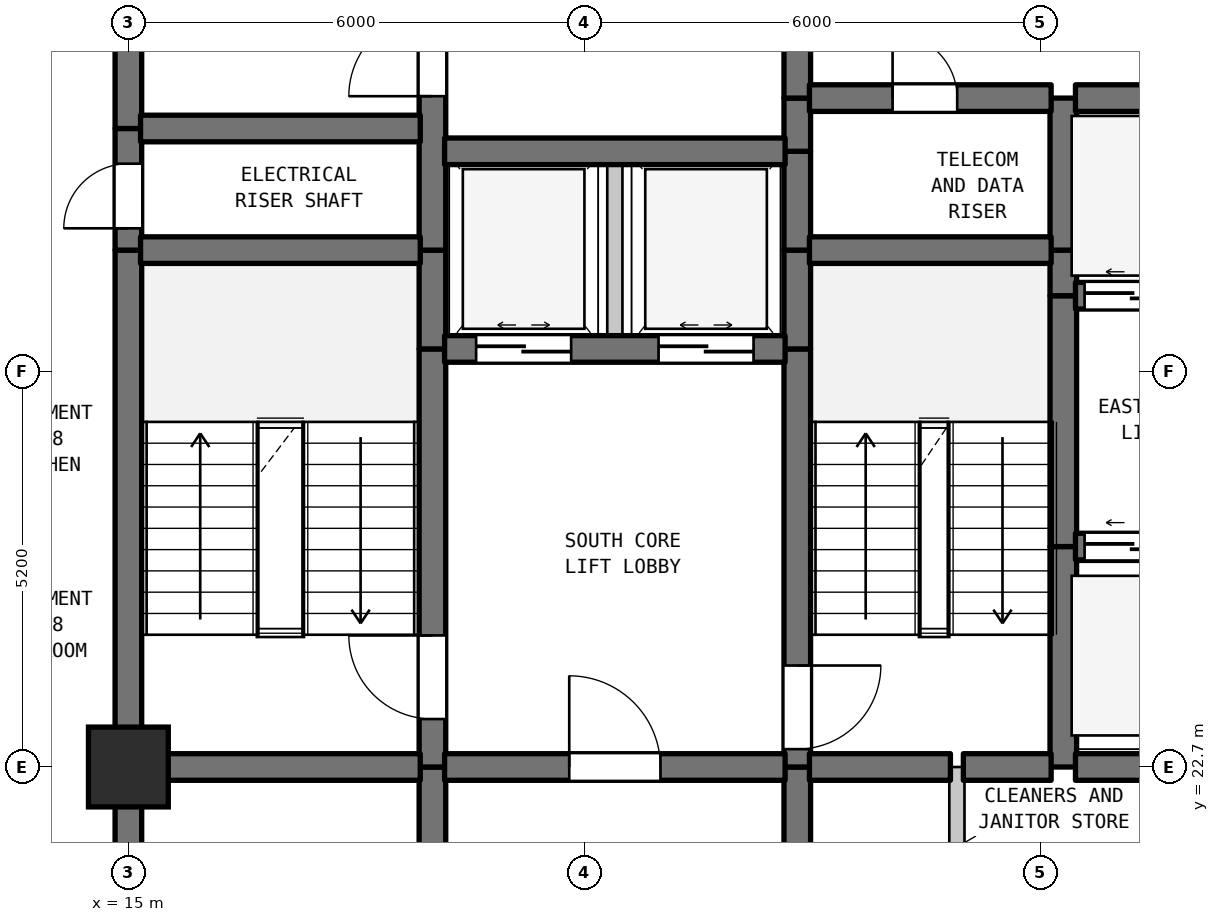
"""IFC4 building model, lengths in metres.
Left out: names, types, materials, properties, quantities, classifications, styles, units other than length and angle.
Written with IfcOpenShell. Run it as: python <this file> out.ifc"""

import sys

from ifc_helpers import new_model, si_unit, direction, frame, frame_2d, origin, origin_2d, place, context, subcontext, project, spatial, rectangle, extrude, element, fill, save


model = new_model("IFC4")
c1 = context("Model", 3, precision=1e-05, world=origin(), true_north=direction((0.0, 1.0)))
c2 = subcontext(c1, "Body", "Model", "MODEL_VIEW")
j1 = project(units=[si_unit("LENGTHUNIT", "METRE"), si_unit("PLANEANGLEUNIT", "RADIAN")], contexts=[c1])
p1 = place(None, origin())
s1 = spatial("IfcSite", under=j1, at=p1, CompositionType="ELEMENT")
p2 = place(p1, origin())
s2 = spatial("IfcBuilding", under=s1, at=p2, CompositionType="ELEMENT")
p3 = place(p2, frame((0.0, 0.0, 98.3)))
s3 = spatial("IfcBuildingStorey", under=s2, at=p3, CompositionType="ELEMENT", Elevation=98.3)
p4 = place(p3, frame((15.0, 22.7, 0.0), z_axis=(0.0, 0.0, 1.0), x_axis=(1.0, 0.0, 0.0)))
e1 = element("IfcColumn", 1, at=p4, inside=s3, PredefinedType="COLUMN", context=c2, shape_type="SweptSolid", body=[
    extrude(rectangle(XDim=1.05, YDim=1.05, at=origin_2d()), origin(), (0.0, 0.0, 1.0), 3.7),
])
p5 = place(p3, frame((15.0, 19.5, 0.0), z_axis=(0.0, 0.0, 1.0), x_axis=(0.0, 1.0, 0.0)))
e2 = element("IfcWall", 2, at=p5, inside=s3, PredefinedType="SHEAR", context=c2, shape_type="SweptSolid", body=[
    extrude(rectangle(XDim=3.2, YDim=0.35, at=frame_2d((1.6, 0.0))), origin(), (0.0, 0.0, 1.0), 3.385),
])
p6 = place(p3, frame((15.0, 22.7, 0.0), z_axis=(0.0, 0.0, 1.0), x_axis=(0.0, 1.0, 0.0)))
e3 = element("IfcWall", 3, at=p6, inside=s3, PredefinedType="SHEAR", context=c2, shape_type="SweptSolid", body=[
    extrude(rectangle(XDim=6.8, YDim=0.35, at=frame_2d((3.4, 0.0))), origin(), (0.0, 0.0, 1.0), 3.385),
])
p7 = place(p3, frame((15.0, 29.5, 0.0), z_axis=(0.0, 0.0, 1.0), x_axis=(0.0, 1.0, 0.0)))
e4 = element("IfcWall", 4, at=p7, inside=s3, PredefinedType="SHEAR", context=c2, shape_type="SweptSolid", body=[
    extrude(rectangle(XDim=1.6, YDim=0.35, at=frame_2d((0.8, 0.0))), origin(), (0.0, 0.0, 1.0), 3.385),
])
p8 = place(p7, frame((0.287, 0.0, 0.0)))
e5 = element("IfcOpeningElement", 5, at=p8, cuts=e4, PredefinedType="OPENING", context=c2, shape_type="SweptSolid", body=[
    extrude(rectangle(XDim=0.85, YDim=2.1, at=frame_2d((0.425, 1.05))), frame((0.0, 0.185, 0.0), z_axis=(0.0, -1.0, 0.0), x_axis=(1.0, 0.0, 0.0)), (0.0, 0.0, 1.0), 0.37),
])
p9 = place(p3, frame((15.0, 31.1, 0.0), z_axis=(0.0, 0.0, 1.0), x_axis=(0.0, 1.0, 0.0)))
e6 = element("IfcWall", 6, at=p9, inside=s3, PredefinedType="SHEAR", context=c2, shape_type="SweptSolid", body=[
    extrude(rectangle(XDim=6.8, YDim=0.35, at=frame_2d((3.4, 0.0))), origin(), (0.0, 0.0, 1.0), 3.385),
])
p10 = place(p3, frame((19.0, 19.5, 0.0), z_axis=(0.0, 0.0, 1.0), x_axis=(0.0, 1.0, 0.0)))
e7 = element("IfcWall", 7, at=p10, inside=s3, PredefinedType="SHEAR", context=c2, shape_type="SweptSolid", body=[
    extrude(rectangle(XDim=3.2, YDim=0.35, at=frame_2d((1.6, 0.0))), origin(), (0.0, 0.0, 1.0), 3.385),
])
p11 = place(p3, frame((19.0, 22.7, 0.0), z_axis=(0.0, 0.0, 1.0), x_axis=(0.0, 1.0, 0.0)))
e8 = element("IfcWall", 8, at=p11, inside=s3, PredefinedType="SHEAR", context=c2, shape_type="SweptSolid", body=[
    extrude(rectangle(XDim=5.5, YDim=0.35, at=frame_2d((2.75, 0.0))), origin(), (0.0, 0.0, 1.0), 3.385),
])
p12 = place(p11, frame((0.631, 0.0, 0.0)))
e9 = element("IfcOpeningElement", 9, at=p12, cuts=e8, PredefinedType="OPENING", context=c2, shape_type="SweptSolid", body=[
    extrude(rectangle(XDim=1.1, YDim=2.15, at=frame_2d((0.55, 1.075))), frame((0.0, 0.185, 0.0), z_axis=(0.0, -1.0, 0.0), x_axis=(1.0, 0.0, 0.0)), (0.0, 0.0, 1.0), 0.37),
])
p13 = place(p3, frame((19.0, 28.2, 0.0), z_axis=(0.0, 0.0, 1.0), x_axis=(0.0, 1.0, 0.0)))
e10 = element("IfcWall", 10, at=p13, inside=s3, PredefinedType="SHEAR", context=c2, shape_type="SweptSolid", body=[
    extrude(rectangle(XDim=1.3, YDim=0.35, at=frame_2d((0.65, 0.0))), origin(), (0.0, 0.0, 1.0), 3.385),
])
p14 = place(p3, frame((19.0, 29.5, 0.0), z_axis=(0.0, 0.0, 1.0), x_axis=(0.0, 1.0, 0.0)))
e11 = element("IfcWall", 11, at=p14, inside=s3, PredefinedType="SHEAR", context=c2, shape_type="SweptSolid", body=[
    extrude(rectangle(XDim=5.5, YDim=0.35, at=frame_2d((2.75, 0.0))), origin(), (0.0, 0.0, 1.0), 3.385),
])
p15 = place(p14, frame((2.025, 0.0, 0.0)))
e12 = element("IfcOpeningElement", 12, at=p15, cuts=e11, PredefinedType="OPENING", context=c2, shape_type="SweptSolid", body=[
    extrude(rectangle(XDim=1.1, YDim=2.15, at=frame_2d((0.55, 1.075))), frame((0.0, 0.185, 0.0), z_axis=(0.0, -1.0, 0.0), x_axis=(1.0, 0.0, 0.0)), (0.0, 0.0, 1.0), 0.37),
])
p16 = place(p3, frame((21.4, 28.2, 0.0), z_axis=(0.0, 0.0, 1.0), x_axis=(0.0, 1.0, 0.0)))
e13 = element("IfcWall", 13, at=p16, inside=s3, PredefinedType="STANDARD", context=c2, shape_type="SweptSolid", body=[
    extrude(rectangle(XDim=2.6, YDim=0.2, at=frame_2d((1.3, 0.0))), origin(), (0.0, 0.0, 1.0), 3.385),
])
p17 = place(p3, frame((23.8, 19.5, 0.0), z_axis=(0.0, 0.0, 1.0), x_axis=(0.0, 1.0, 0.0)))
e14 = element("IfcWall", 14, at=p17, inside=s3, PredefinedType="SHEAR", context=c2, shape_type="SweptSolid", body=[
    extrude(rectangle(XDim=3.2, YDim=0.35, at=frame_2d((1.6, 0.0))), origin(), (0.0, 0.0, 1.0), 3.385),
])
p18 = place(p3, frame((23.8, 22.7, 0.0), z_axis=(0.0, 0.0, 1.0), x_axis=(0.0, 1.0, 0.0)))
e15 = element("IfcWall", 15, at=p18, inside=s3, PredefinedType="SHEAR", context=c2, shape_type="SweptSolid", body=[
    extrude(rectangle(XDim=5.5, YDim=0.35, at=frame_2d((2.75, 0.0))), origin(), (0.0, 0.0, 1.0), 3.385),
])
p19 = place(p18, frame((0.235, 0.0, 0.0)))
e16 = element("IfcOpeningElement", 16, at=p19, cuts=e15, PredefinedType="OPENING", context=c2, shape_type="SweptSolid", body=[
    extrude(rectangle(XDim=1.1, YDim=2.15, at=frame_2d((0.55, 1.075))), frame((0.0, 0.185, 0.0), z_axis=(0.0, -1.0, 0.0), x_axis=(1.0, 0.0, 0.0)), (0.0, 0.0, 1.0), 0.37),
])
for number, where, z_axis, x_axis in (
    (17, (23.8, 28.2, 0.0), (0.0, 0.0, 1.0), (0.0, 1.0, 0.0)),
    (18, (23.8, 29.5, 0.0), (0.0, 0.0, 1.0), (0.0, 1.0, 0.0)),
):
    element("IfcWall", number, at=place(p3, frame(where, z_axis=z_axis, x_axis=x_axis)), inside=s3, PredefinedType="SHEAR", context=c2, shape_type="SweptSolid", body=[
        extrude(rectangle(XDim=1.3, YDim=0.35, at=frame_2d((0.65, 0.0))), origin(), (0.0, 0.0, 1.0), 3.385),
    ])
p20 = place(p3, frame((23.8, 30.8, 0.0), z_axis=(0.0, 0.0, 1.0), x_axis=(0.0, 1.0, 0.0)))
e19 = element("IfcWall", 19, at=p20, inside=s3, PredefinedType="SHEAR", context=c2, shape_type="SweptSolid", body=[
    extrude(rectangle(XDim=0.7, YDim=0.35, at=frame_2d((0.35, 0.0))), origin(), (0.0, 0.0, 1.0), 3.385),
])
p21 = place(p3, frame((23.8, 31.5, 0.0), z_axis=(0.0, 0.0, 1.0), x_axis=(0.0, 1.0, 0.0)))
e20 = element("IfcWall", 20, at=p21, inside=s3, PredefinedType="SHEAR", context=c2, shape_type="SweptSolid", body=[
    extrude(rectangle(XDim=3.5, YDim=0.35, at=frame_2d((1.75, 0.0))), origin(), (0.0, 0.0, 1.0), 3.385),
])
p22 = place(p21, frame((1.127, 0.0, 0.0)))
e21 = element("IfcOpeningElement", 21, at=p22, cuts=e20, PredefinedType="OPENING", context=c2, shape_type="SweptSolid", body=[
    extrude(rectangle(XDim=1.1, YDim=2.15, at=frame_2d((0.55, 1.075))), frame((0.0, 0.185, 0.0), z_axis=(0.0, -1.0, 0.0), x_axis=(1.0, 0.0, 0.0)), (0.0, 0.0, 1.0), 0.37),
])
p23 = place(p3, frame((25.9, 19.5, 0.0), z_axis=(0.0, 0.0, 1.0), x_axis=(0.0, 1.0, 0.0)))
e22 = element("IfcWall", 22, at=p23, inside=s3, PredefinedType="STANDARD", context=c2, shape_type="SweptSolid", body=[
    extrude(rectangle(XDim=3.2, YDim=0.2, at=frame_2d((1.6, 0.0))), origin(), (0.0, 0.0, 1.0), 3.385),
])
p24 = place(p3, frame((27.3, 22.7, 0.0), z_axis=(0.0, 0.0, 1.0), x_axis=(0.0, 1.0, 0.0)))
e23 = element("IfcWall", 23, at=p24, inside=s3, PredefinedType="SHEAR", context=c2, shape_type="SweptSolid", body=[
    extrude(rectangle(XDim=2.9, YDim=0.35, at=frame_2d((1.45, 0.0))), origin(), (0.0, 0.0, 1.0), 3.385),
])
p25 = place(p3, frame((27.3, 25.6, 0.0), z_axis=(0.0, 0.0, 1.0), x_axis=(0.0, 1.0, 0.0)))
e24 = element("IfcWall", 24, at=p25, inside=s3, PredefinedType="SHEAR", context=c2, shape_type="SweptSolid", body=[
    extrude(rectangle(XDim=3.3, YDim=0.35, at=frame_2d((1.65, 0.0))), origin(), (0.0, 0.0, 1.0), 3.385),
])
p26 = place(p3, frame((27.3, 28.9, 0.0), z_axis=(0.0, 0.0, 1.0), x_axis=(0.0, 1.0, 0.0)))
e25 = element("IfcWall", 25, at=p26, inside=s3, PredefinedType="SHEAR", context=c2, shape_type="SweptSolid", body=[
    extrude(rectangle(XDim=0.6, YDim=0.35, at=frame_2d((0.3, 0.0))), origin(), (0.0, 0.0, 1.0), 3.385),
])
p27 = place(p3, frame((27.3, 29.5, 0.0), z_axis=(0.0, 0.0, 1.0), x_axis=(0.0, 1.0, 0.0)))
e26 = element("IfcWall", 26, at=p27, inside=s3, PredefinedType="SHEAR", context=c2, shape_type="SweptSolid", body=[
    extrude(rectangle(XDim=2.0, YDim=0.35, at=frame_2d((1.0, 0.0))), origin(), (0.0, 0.0, 1.0), 3.385),
])
p28 = place(p3, frame((15.16, 22.7, 0.0), z_axis=(0.0, 0.0, 1.0), x_axis=(1.0, 0.0, 0.0)))
e27 = element("IfcWall", 27, at=p28, inside=s3, PredefinedType="SHEAR", context=c2, shape_type="SweptSolid", body=[
    extrude(rectangle(XDim=3.68, YDim=0.35, at=frame_2d((1.84, 0.0))), origin(), (0.0, 0.0, 1.0), 3.385),
])
p29 = place(p3, frame((19.16, 22.7, 0.0), z_axis=(0.0, 0.0, 1.0), x_axis=(1.0, 0.0, 0.0)))
e28 = element("IfcWall", 28, at=p29, inside=s3, PredefinedType="SHEAR", context=c2, shape_type="SweptSolid", body=[
    extrude(rectangle(XDim=4.48, YDim=0.35, at=frame_2d((2.24, 0.0))), origin(), (0.0, 0.0, 1.0), 3.385),
])
p30 = place(p29, frame((1.64, 0.0, 0.0)))
e29 = element("IfcOpeningElement", 29, at=p30, cuts=e28, PredefinedType="OPENING", context=c2, shape_type="SweptSolid", body=[
    extrude(rectangle(XDim=1.2, YDim=2.2, at=frame_2d((0.6, 1.1))), frame((0.0, 0.185, 0.0), z_axis=(0.0, -1.0, 0.0), x_axis=(1.0, 0.0, 0.0)), (0.0, 0.0, 1.0), 0.37),
])
p31 = place(p3, frame((23.96, 22.7, 0.0), z_axis=(0.0, 0.0, 1.0), x_axis=(1.0, 0.0, 0.0)))
e30 = element("IfcWall", 30, at=p31, inside=s3, PredefinedType="SHEAR", context=c2, shape_type="SweptSolid", body=[
    extrude(rectangle(XDim=1.855, YDim=0.35, at=frame_2d((0.927, 0.0))), origin(), (0.0, 0.0, 1.0), 3.385),
])
p32 = place(p3, frame((25.985, 22.7, 0.0), z_axis=(0.0, 0.0, 1.0), x_axis=(1.0, 0.0, 0.0)))
e31 = element("IfcWall", 31, at=p32, inside=s3, PredefinedType="SHEAR", context=c2, shape_type="SweptSolid", body=[
    extrude(rectangle(XDim=1.155, YDim=0.35, at=frame_2d((0.577, 0.0))), origin(), (0.0, 0.0, 1.0), 3.385),
])
p33 = place(p3, frame((27.46, 22.7, 0.0), z_axis=(0.0, 0.0, 1.0), x_axis=(1.0, 0.0, 0.0)))
e32 = element("IfcWall", 32, at=p33, inside=s3, PredefinedType="SHEAR", context=c2, shape_type="SweptSolid", body=[
    extrude(rectangle(XDim=3.18, YDim=0.35, at=frame_2d((1.59, 0.0))), origin(), (0.0, 0.0, 1.0), 3.385),
])
p34 = place(p3, frame((27.46, 25.6, 0.0), z_axis=(0.0, 0.0, 1.0), x_axis=(1.0, 0.0, 0.0)))
e33 = element("IfcWall", 33, at=p34, inside=s3, PredefinedType="SHEAR", context=c2, shape_type="SweptSolid", body=[
    extrude(rectangle(XDim=3.18, YDim=0.35, at=frame_2d((1.59, 0.0))), origin(), (0.0, 0.0, 1.0), 3.385),
])
p35 = place(p34, frame((0.12, 0.0, 0.0)))
e34 = element("IfcOpeningElement", 34, at=p35, cuts=e33, PredefinedType="OPENING", context=c2, shape_type="SweptSolid", body=[
    extrude(rectangle(XDim=1.25, YDim=2.2, at=frame_2d((0.625, 1.1))), frame((0.0, 0.185, 0.0), z_axis=(0.0, -1.0, 0.0), x_axis=(1.0, 0.0, 0.0)), (0.0, 0.0, 1.0), 0.37),
])
p36 = place(p34, frame((1.81, 0.0, 0.0)))
e35 = element("IfcOpeningElement", 35, at=p36, cuts=e33, PredefinedType="OPENING", context=c2, shape_type="SweptSolid", body=[
    extrude(rectangle(XDim=1.25, YDim=2.2, at=frame_2d((0.625, 1.1))), frame((0.0, 0.185, 0.0), z_axis=(0.0, -1.0, 0.0), x_axis=(1.0, 0.0, 0.0)), (0.0, 0.0, 1.0), 0.37),
])
p37 = place(p3, frame((19.16, 28.2, 0.0), z_axis=(0.0, 0.0, 1.0), x_axis=(1.0, 0.0, 0.0)))
e36 = element("IfcWall", 36, at=p37, inside=s3, PredefinedType="SHEAR", context=c2, shape_type="SweptSolid", body=[
    extrude(rectangle(XDim=4.48, YDim=0.35, at=frame_2d((2.24, 0.0))), origin(), (0.0, 0.0, 1.0), 3.385),
])
p38 = place(p37, frame((0.415, 0.0, 0.0)))
e37 = element("IfcOpeningElement", 37, at=p38, cuts=e36, PredefinedType="OPENING", context=c2, shape_type="SweptSolid", body=[
    extrude(rectangle(XDim=1.25, YDim=2.2, at=frame_2d((0.625, 1.1))), frame((0.0, 0.185, 0.0), z_axis=(0.0, -1.0, 0.0), x_axis=(1.0, 0.0, 0.0)), (0.0, 0.0, 1.0), 0.37),
])
p39 = place(p37, frame((2.815, 0.0, 0.0)))
e38 = element("IfcOpeningElement", 38, at=p39, cuts=e36, PredefinedType="OPENING", context=c2, shape_type="SweptSolid", body=[
    extrude(rectangle(XDim=1.25, YDim=2.2, at=frame_2d((0.625, 1.1))), frame((0.0, 0.185, 0.0), z_axis=(0.0, -1.0, 0.0), x_axis=(1.0, 0.0, 0.0)), (0.0, 0.0, 1.0), 0.37),
])
p40 = place(p3, frame((27.46, 28.9, 0.0), z_axis=(0.0, 0.0, 1.0), x_axis=(1.0, 0.0, 0.0)))
e39 = element("IfcWall", 39, at=p40, inside=s3, PredefinedType="SHEAR", context=c2, shape_type="SweptSolid", body=[
    extrude(rectangle(XDim=3.18, YDim=0.35, at=frame_2d((1.59, 0.0))), origin(), (0.0, 0.0, 1.0), 3.385),
])
p41 = place(p40, frame((0.12, 0.0, 0.0)))
e40 = element("IfcOpeningElement", 40, at=p41, cuts=e39, PredefinedType="OPENING", context=c2, shape_type="SweptSolid", body=[
    extrude(rectangle(XDim=1.25, YDim=2.2, at=frame_2d((0.625, 1.1))), frame((0.0, 0.185, 0.0), z_axis=(0.0, -1.0, 0.0), x_axis=(1.0, 0.0, 0.0)), (0.0, 0.0, 1.0), 0.37),
])
p42 = place(p40, frame((1.81, 0.0, 0.0)))
e41 = element("IfcOpeningElement", 41, at=p42, cuts=e39, PredefinedType="OPENING", context=c2, shape_type="SweptSolid", body=[
    extrude(rectangle(XDim=1.25, YDim=2.2, at=frame_2d((0.625, 1.1))), frame((0.0, 0.185, 0.0), z_axis=(0.0, -1.0, 0.0), x_axis=(1.0, 0.0, 0.0)), (0.0, 0.0, 1.0), 0.37),
])
p43 = place(p3, frame((15.16, 29.5, 0.0), z_axis=(0.0, 0.0, 1.0), x_axis=(1.0, 0.0, 0.0)))
e42 = element("IfcWall", 42, at=p43, inside=s3, PredefinedType="SHEAR", context=c2, shape_type="SweptSolid", body=[
    extrude(rectangle(XDim=3.68, YDim=0.35, at=frame_2d((1.84, 0.0))), origin(), (0.0, 0.0, 1.0), 3.385),
])
p44 = place(p3, frame((23.96, 29.5, 0.0), z_axis=(0.0, 0.0, 1.0), x_axis=(1.0, 0.0, 0.0)))
e43 = element("IfcWall", 43, at=p44, inside=s3, PredefinedType="SHEAR", context=c2, shape_type="SweptSolid", body=[
    extrude(rectangle(XDim=3.18, YDim=0.35, at=frame_2d((1.59, 0.0))), origin(), (0.0, 0.0, 1.0), 3.385),
])
p45 = place(p3, frame((19.16, 30.8, 0.0), z_axis=(0.0, 0.0, 1.0), x_axis=(1.0, 0.0, 0.0)))
e44 = element("IfcWall", 44, at=p45, inside=s3, PredefinedType="SHEAR", context=c2, shape_type="SweptSolid", body=[
    extrude(rectangle(XDim=4.48, YDim=0.35, at=frame_2d((2.24, 0.0))), origin(), (0.0, 0.0, 1.0), 3.385),
])
p46 = place(p3, frame((15.16, 31.1, 0.0), z_axis=(0.0, 0.0, 1.0), x_axis=(1.0, 0.0, 0.0)))
e45 = element("IfcWall", 45, at=p46, inside=s3, PredefinedType="SHEAR", context=c2, shape_type="SweptSolid", body=[
    extrude(rectangle(XDim=3.68, YDim=0.35, at=frame_2d((1.84, 0.0))), origin(), (0.0, 0.0, 1.0), 3.385),
])
p47 = place(p3, frame((23.96, 31.5, 0.0), z_axis=(0.0, 0.0, 1.0), x_axis=(1.0, 0.0, 0.0)))
e46 = element("IfcWall", 46, at=p47, inside=s3, PredefinedType="SHEAR", context=c2, shape_type="SweptSolid", body=[
    extrude(rectangle(XDim=3.18, YDim=0.35, at=frame_2d((1.59, 0.0))), origin(), (0.0, 0.0, 1.0), 3.385),
])
p48 = place(p47, frame((1.094, 0.0, 0.0)))
e47 = element("IfcOpeningElement", 47, at=p48, cuts=e46, PredefinedType="OPENING", context=c2, shape_type="SweptSolid", body=[
    extrude(rectangle(XDim=0.85, YDim=2.1, at=frame_2d((0.425, 1.05))), frame((0.0, 0.185, 0.0), z_axis=(0.0, -1.0, 0.0), x_axis=(1.0, 0.0, 0.0)), (0.0, 0.0, 1.0), 0.37),
])
p49 = place(p3, frame((27.46, 31.5, 0.0), z_axis=(0.0, 0.0, 1.0), x_axis=(1.0, 0.0, 0.0)))
e48 = element("IfcWall", 48, at=p49, inside=s3, PredefinedType="SHEAR", context=c2, shape_type="SweptSolid", body=[
    extrude(rectangle(XDim=3.18, YDim=0.35, at=frame_2d((1.59, 0.0))), origin(), (0.0, 0.0, 1.0), 3.385),
])
p50 = place(p8, origin())
e49 = element("IfcDoor", 49, at=p50, inside=s3, OperationType="SINGLE_SWING_LEFT", PredefinedType="DOOR", context=c2, shape_type="SweptSolid", body=[
    extrude(rectangle(XDim=0.85, YDim=2.1, at=frame_2d((0.425, 1.05))), frame((0.0, 0.025, 0.0), z_axis=(0.0, -1.0, 0.0), x_axis=(1.0, 0.0, 0.0)), (0.0, 0.0, 1.0), 0.05),
])
fill(e5, e49)
p51 = place(p12, origin())
e50 = element("IfcDoor", 50, at=p51, inside=s3, OperationType="SINGLE_SWING_RIGHT", PredefinedType="DOOR", context=c2, shape_type="SweptSolid", body=[
    extrude(rectangle(XDim=1.1, YDim=2.15, at=frame_2d((0.55, 1.075))), frame((0.0, 0.025, 0.0), z_axis=(0.0, -1.0, 0.0), x_axis=(1.0, 0.0, 0.0)), (0.0, 0.0, 1.0), 0.05),
])
fill(e9, e50)
p52 = place(p15, origin())
e51 = element("IfcDoor", 51, at=p52, inside=s3, OperationType="SINGLE_SWING_LEFT", PredefinedType="DOOR", context=c2, shape_type="SweptSolid", body=[
    extrude(rectangle(XDim=1.1, YDim=2.15, at=frame_2d((0.55, 1.075))), frame((0.0, 0.025, 0.0), z_axis=(0.0, -1.0, 0.0), x_axis=(1.0, 0.0, 0.0)), (0.0, 0.0, 1.0), 0.05),
])
fill(e12, e51)
p53 = place(p19, frame((1.1, 0.0, 0.0), z_axis=(0.0, 0.0, 1.0), x_axis=(-1.0, 0.0, 0.0)))
e52 = element("IfcDoor", 52, at=p53, inside=s3, OperationType="SINGLE_SWING_RIGHT", PredefinedType="DOOR", context=c2, shape_type="SweptSolid", body=[
    extrude(rectangle(XDim=1.1, YDim=2.15, at=frame_2d((0.55, 1.075))), frame((0.0, 0.025, 0.0), z_axis=(0.0, -1.0, 0.0), x_axis=(1.0, 0.0, 0.0)), (0.0, 0.0, 1.0), 0.05),
])
fill(e16, e52)
p54 = place(p30, origin())
e53 = element("IfcDoor", 53, at=p54, inside=s3, OperationType="SINGLE_SWING_LEFT", PredefinedType="DOOR", context=c2, shape_type="SweptSolid", body=[
    extrude(rectangle(XDim=1.2, YDim=2.2, at=frame_2d((0.6, 1.1))), frame((0.0, 0.025, 0.0), z_axis=(0.0, -1.0, 0.0), x_axis=(1.0, 0.0, 0.0)), (0.0, 0.0, 1.0), 0.05),
])
fill(e29, e53)
p55 = place(p35, origin())
e54 = element("IfcDoor", 54, at=p55, inside=s3, OperationType="DOUBLE_DOOR_SLIDING", PredefinedType="DOOR", context=c2, shape_type="SweptSolid", body=[
    extrude(rectangle(XDim=1.25, YDim=2.2, at=frame_2d((0.625, 1.1))), frame((0.0, 0.025, 0.0), z_axis=(0.0, -1.0, 0.0), x_axis=(1.0, 0.0, 0.0)), (0.0, 0.0, 1.0), 0.05),
])
fill(e34, e54)
p56 = place(p38, origin())
e55 = element("IfcDoor", 55, at=p56, inside=s3, OperationType="DOUBLE_DOOR_SLIDING", PredefinedType="DOOR", context=c2, shape_type="SweptSolid", body=[
    extrude(rectangle(XDim=1.25, YDim=2.2, at=frame_2d((0.625, 1.1))), frame((0.0, 0.025, 0.0), z_axis=(0.0, -1.0, 0.0), x_axis=(1.0, 0.0, 0.0)), (0.0, 0.0, 1.0), 0.05),
])
fill(e37, e55)
p57 = place(p39, origin())
e56 = element("IfcDoor", 56, at=p57, inside=s3, OperationType="DOUBLE_DOOR_SLIDING", PredefinedType="DOOR", context=c2, shape_type="SweptSolid", body=[
    extrude(rectangle(XDim=1.25, YDim=2.2, at=frame_2d((0.625, 1.1))), frame((0.0, 0.025, 0.0), z_axis=(0.0, -1.0, 0.0), x_axis=(1.0, 0.0, 0.0)), (0.0, 0.0, 1.0), 0.05),
])
fill(e38, e56)
p58 = place(p41, origin())
e57 = element("IfcDoor", 57, at=p58, inside=s3, OperationType="DOUBLE_DOOR_SLIDING", PredefinedType="DOOR", context=c2, shape_type="SweptSolid", body=[
    extrude(rectangle(XDim=1.25, YDim=2.2, at=frame_2d((0.625, 1.1))), frame((0.0, 0.025, 0.0), z_axis=(0.0, -1.0, 0.0), x_axis=(1.0, 0.0, 0.0)), (0.0, 0.0, 1.0), 0.05),
])
fill(e40, e57)
p59 = place(p48, origin())
e58 = element("IfcDoor", 58, at=p59, inside=s3, OperationType="SINGLE_SWING_LEFT", PredefinedType="DOOR", context=c2, shape_type="SweptSolid", body=[
    extrude(rectangle(XDim=0.85, YDim=2.1, at=frame_2d((0.425, 1.05))), frame((0.0, 0.025, 0.0), z_axis=(0.0, -1.0, 0.0), x_axis=(1.0, 0.0, 0.0)), (0.0, 0.0, 1.0), 0.05),
])
fill(e47, e58)
save(model, sys.argv[1])
